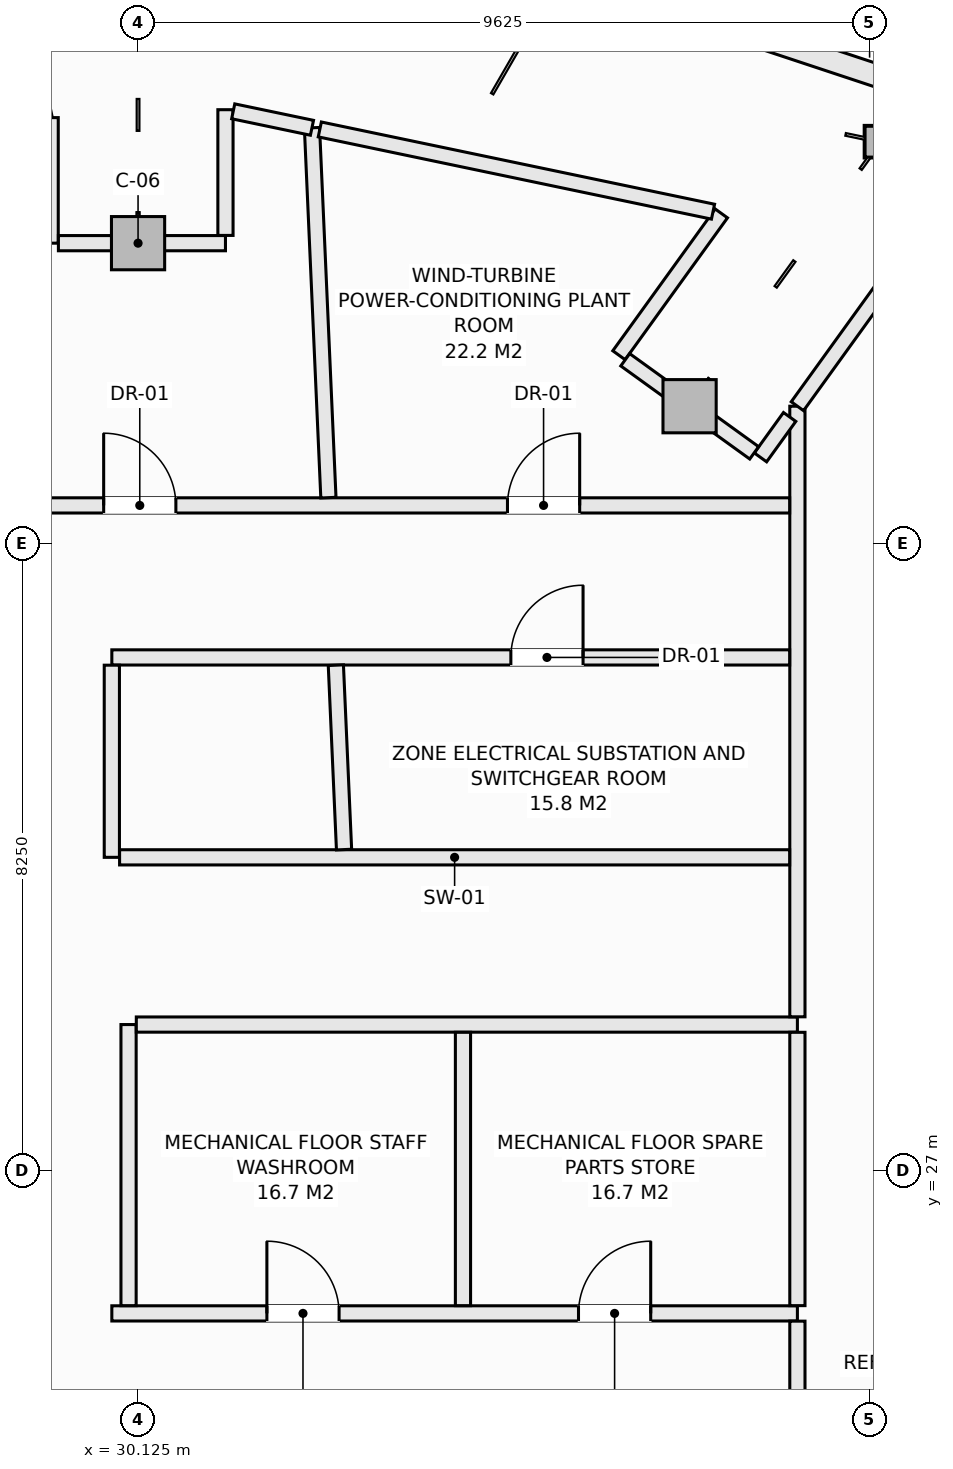
"""IFC4 building model, lengths in metres.
Left out: names, types, materials, properties, quantities, classifications, styles, units other than length and angle.
Written with IfcOpenShell. Run it as: python <this file> out.ifc"""

import sys

from ifc_helpers import new_model, si_unit, direction, frame, frame_2d, origin, origin_2d, place, context, subcontext, project, spatial, rectangle, hollow_rectangle, extrude, element, fill, save


model = new_model("IFC4")
c1 = context("Model", 3, precision=1e-05, world=origin(), true_north=direction((0.0, 1.0)))
c2 = subcontext(c1, "Body", "Model", "MODEL_VIEW")
j1 = project(units=[si_unit("LENGTHUNIT", "METRE"), si_unit("PLANEANGLEUNIT", "RADIAN")], contexts=[c1])
p1 = place(None, origin())
s1 = spatial("IfcSite", under=j1, at=p1, CompositionType="ELEMENT")
p2 = place(p1, origin())
s2 = spatial("IfcBuilding", under=s1, at=p2, CompositionType="ELEMENT")
p3 = place(p2, frame((0.0, 0.0, 275.6)))
s3 = spatial("IfcBuildingStorey", under=s2, at=p3, CompositionType="ELEMENT", Elevation=275.6)
p4 = place(p3, frame((39.893, 40.535, -0.32), z_axis=(0.0, 0.0, 1.0), x_axis=(1.0, 0.0, 0.0)))
e1 = element("IfcColumn", 1, at=p4, inside=s3, PredefinedType="COLUMN", context=c2, shape_type="SweptSolid", body=[
    extrude(hollow_rectangle(XDim=0.406, YDim=0.406, WallThickness=0.016, at=origin_2d()), origin(), (0.0, 0.0, 1.0), 6.04),
])
for number, where, z_axis, x_axis in (
    (2, (37.382, 37.055, -0.32), (0.0, 0.0, 1.0), (1.0, 0.0, 0.0)),
    (3, (30.125, 39.2, -0.32), (0.0, 0.0, 1.0), (1.0, 0.0, 0.0)),
):
    element("IfcColumn", number, at=place(p3, frame(where, z_axis=z_axis, x_axis=x_axis)), inside=s3, PredefinedType="COLUMN", context=c2, shape_type="SweptSolid", body=[
        extrude(rectangle(XDim=0.7, YDim=0.7, at=origin_2d()), origin(), (0.0, 0.0, 1.0), 6.04),
    ])
p5 = place(p3, frame((35.439, 42.865, 0.0), z_axis=(0.0, 0.0, 1.0), x_axis=(0.949252744709, -0.314514271001, 0.0)))
e4 = element("IfcWall", 4, at=p5, inside=s3, PredefinedType="SOLIDWALL", context=c2, shape_type="SweptSolid", body=[
    extrude(rectangle(XDim=5.216, YDim=0.3, at=frame_2d((2.608, 0.0))), origin(), (0.0, 0.0, 1.0), 1.15),
])
p6 = place(p3, frame((29.78, 25.12, 0.0), z_axis=(0.0, 0.0, 1.0), x_axis=(1.0, 0.0, 0.0)))
e5 = element("IfcWall", 5, at=p6, inside=s3, PredefinedType="SOLIDWALL", context=c2, shape_type="SweptSolid", body=[
    extrude(rectangle(XDim=9.02, YDim=0.2, at=frame_2d((4.51, 0.0))), origin(), (0.0, 0.0, 1.0), 5.72),
])
p7 = place(p6, frame((2.04, 0.0, 0.0)))
e6 = element("IfcOpeningElement", 6, at=p7, cuts=e5, PredefinedType="OPENING", context=c2, shape_type="SweptSolid", body=[
    extrude(rectangle(XDim=0.95, YDim=2.1, at=frame_2d((0.475, 1.05))), frame((0.0, 0.11, 0.0), z_axis=(0.0, -1.0, 0.0), x_axis=(1.0, 0.0, 0.0)), (0.0, 0.0, 1.0), 0.22),
])
p8 = place(p6, frame((6.14, 0.0, 0.0)))
e7 = element("IfcOpeningElement", 7, at=p8, cuts=e5, PredefinedType="OPENING", context=c2, shape_type="SweptSolid", body=[
    extrude(rectangle(XDim=0.95, YDim=2.1, at=frame_2d((0.475, 1.05))), frame((0.0, 0.11, 0.0), z_axis=(0.0, -1.0, 0.0), x_axis=(1.0, 0.0, 0.0)), (0.0, 0.0, 1.0), 0.22),
])
p9 = place(p3, frame((30.0, 25.222, 0.0), z_axis=(0.0, 0.0, 1.0), x_axis=(0.0, 1.0, 0.0)))
e8 = element("IfcWall", 8, at=p9, inside=s3, PredefinedType="SOLIDWALL", context=c2, shape_type="SweptSolid", body=[
    extrude(rectangle(XDim=3.698, YDim=0.2, at=frame_2d((1.849, 0.0))), origin(), (0.0, 0.0, 1.0), 5.72),
])
p10 = place(p3, frame((30.102, 28.92, 0.0), z_axis=(0.0, 0.0, 1.0), x_axis=(1.0, 0.0, 0.0)))
e9 = element("IfcWall", 9, at=p10, inside=s3, PredefinedType="SOLIDWALL", context=c2, shape_type="SweptSolid", body=[
    extrude(rectangle(XDim=8.698, YDim=0.2, at=frame_2d((4.349, 0.0))), origin(), (0.0, 0.0, 1.0), 5.72),
])
p11 = place(p3, frame((34.4, 25.222, 0.0), z_axis=(0.0, 0.0, 1.0), x_axis=(0.0, 1.0, 0.0)))
e10 = element("IfcWall", 10, at=p11, inside=s3, PredefinedType="SOLIDWALL", context=c2, shape_type="SweptSolid", body=[
    extrude(rectangle(XDim=3.596, YDim=0.2, at=frame_2d((1.798, 0.0))), origin(), (0.0, 0.0, 1.0), 5.72),
])
p12 = place(p3, frame((38.8, 23.02, 0.0), z_axis=(0.0, 0.0, 1.0), x_axis=(0.0, 1.0, 0.0)))
e11 = element("IfcWall", 11, at=p12, inside=s3, PredefinedType="SOLIDWALL", context=c2, shape_type="SweptSolid", body=[
    extrude(rectangle(XDim=1.998, YDim=0.2, at=frame_2d((0.999, 0.0))), origin(), (0.0, 0.0, 1.0), 5.72),
])
p13 = place(p3, frame((38.8, 25.222, 0.0), z_axis=(0.0, 0.0, 1.0), x_axis=(0.0, 1.0, 0.0)))
e12 = element("IfcWall", 12, at=p13, inside=s3, PredefinedType="SOLIDWALL", context=c2, shape_type="SweptSolid", body=[
    extrude(rectangle(XDim=3.596, YDim=0.2, at=frame_2d((1.798, 0.0))), origin(), (0.0, 0.0, 1.0), 5.72),
])
p14 = place(p3, frame((38.8, 29.022, 0.0), z_axis=(0.0, 0.0, 1.0), x_axis=(0.0, 1.0, 0.0)))
e13 = element("IfcWall", 13, at=p14, inside=s3, PredefinedType="SOLIDWALL", context=c2, shape_type="SweptSolid", body=[
    extrude(rectangle(XDim=8.033, YDim=0.2, at=frame_2d((4.017, 0.0))), origin(), (0.0, 0.0, 1.0), 5.72),
])
p15 = place(p3, frame((27.252, 35.75, 0.0), z_axis=(0.0, 0.0, 1.0), x_axis=(1.0, 0.0, 0.0)))
e14 = element("IfcWall", 14, at=p15, inside=s3, PredefinedType="SOLIDWALL", context=c2, shape_type="SweptSolid", body=[
    extrude(rectangle(XDim=11.446, YDim=0.2, at=frame_2d((5.723, 0.0))), origin(), (0.0, 0.0, 1.0), 5.168),
])
p16 = place(p15, frame((2.421, 0.0, 0.0)))
e15 = element("IfcOpeningElement", 15, at=p16, cuts=e14, PredefinedType="OPENING", context=c2, shape_type="SweptSolid", body=[
    extrude(rectangle(XDim=0.95, YDim=2.1, at=frame_2d((0.475, 1.05))), frame((0.0, 0.11, 0.0), z_axis=(0.0, -1.0, 0.0), x_axis=(1.0, 0.0, 0.0)), (0.0, 0.0, 1.0), 0.22),
])
p17 = place(p15, frame((7.733, 0.0, 0.0)))
e16 = element("IfcOpeningElement", 16, at=p17, cuts=e14, PredefinedType="OPENING", context=c2, shape_type="SweptSolid", body=[
    extrude(rectangle(XDim=0.95, YDim=2.1, at=frame_2d((0.475, 1.05))), frame((0.0, 0.11, 0.0), z_axis=(0.0, -1.0, 0.0), x_axis=(1.0, 0.0, 0.0)), (0.0, 0.0, 1.0), 0.22),
])
p18 = place(p3, frame((29.78, 33.75, 0.0), z_axis=(0.0, 0.0, 1.0), x_axis=(1.0, 0.0, 0.0)))
e17 = element("IfcWall", 17, at=p18, inside=s3, PredefinedType="SOLIDWALL", context=c2, shape_type="SweptSolid", body=[
    extrude(rectangle(XDim=8.918, YDim=0.2, at=frame_2d((4.459, 0.0))), origin(), (0.0, 0.0, 1.0), 5.72),
])
p19 = place(p18, frame((5.25, 0.0, 0.0)))
e18 = element("IfcOpeningElement", 18, at=p19, cuts=e17, PredefinedType="OPENING", context=c2, shape_type="SweptSolid", body=[
    extrude(rectangle(XDim=0.95, YDim=2.1, at=frame_2d((0.475, 1.05))), frame((0.0, 0.11, 0.0), z_axis=(0.0, -1.0, 0.0), x_axis=(1.0, 0.0, 0.0)), (0.0, 0.0, 1.0), 0.22),
])
p20 = place(p3, frame((29.78, 31.12, 0.0), z_axis=(0.0, 0.0, 1.0), x_axis=(0.0, 1.0, 0.0)))
e19 = element("IfcWall", 19, at=p20, inside=s3, PredefinedType="SOLIDWALL", context=c2, shape_type="SweptSolid", body=[
    extrude(rectangle(XDim=2.528, YDim=0.2, at=frame_2d((1.264, 0.0))), origin(), (0.0, 0.0, 1.0), 5.72),
])
p21 = place(p3, frame((29.882, 31.12, 0.0), z_axis=(0.0, 0.0, 1.0), x_axis=(1.0, 0.0, 0.0)))
e20 = element("IfcWall", 20, at=p21, inside=s3, PredefinedType="SOLIDWALL", context=c2, shape_type="SweptSolid", body=[
    extrude(rectangle(XDim=8.816, YDim=0.2, at=frame_2d((4.408, 0.0))), origin(), (0.0, 0.0, 1.0), 5.72),
])
p22 = place(p3, frame((38.314, 36.382, 0.0), z_axis=(0.0, 0.0, 1.0), x_axis=(0.585069222784, 0.810983356519, 0.0)))
e21 = element("IfcWall", 21, at=p22, inside=s3, PredefinedType="SOLIDWALL", context=c2, shape_type="SweptSolid", body=[
    extrude(rectangle(XDim=0.656, YDim=0.2, at=frame_2d((0.328, 0.0))), origin(), (0.0, 0.0, 1.0), 5.72),
])
p23 = place(p3, frame((38.8, 37.055, 0.0), z_axis=(0.0, 0.0, 1.0), x_axis=(0.585158028997, 0.810919281495, 0.0)))
e22 = element("IfcWall", 22, at=p23, inside=s3, PredefinedType="SOLIDWALL", context=c2, shape_type="SweptSolid", body=[
    extrude(rectangle(XDim=2.064, YDim=0.2, at=frame_2d((1.032, 0.0))), origin(), (0.0, 0.0, 1.0), 5.72),
])
p24 = place(p3, frame((36.452, 37.726, 0.0), z_axis=(0.0, 0.0, 1.0), x_axis=(0.585304643713, 0.810813464397, 0.0)))
e23 = element("IfcWall", 23, at=p24, inside=s3, PredefinedType="SOLIDWALL", context=c2, shape_type="SweptSolid", body=[
    extrude(rectangle(XDim=2.302, YDim=0.2, at=frame_2d((1.151, 0.0))), origin(), (0.0, 0.0, 1.0), 5.72),
])
p25 = place(p3, frame((32.413, 40.718, 0.0), z_axis=(0.0, 0.0, 1.0), x_axis=(0.044359482004, -0.99901563369, 0.0)))
e24 = element("IfcWall", 24, at=p25, inside=s3, PredefinedType="SOLIDWALL", context=c2, shape_type="SweptSolid", body=[
    extrude(rectangle(XDim=4.871, YDim=0.2, at=frame_2d((2.436, 0.0))), origin(), (0.0, 0.0, 1.0), 5.72),
])
p26 = place(p3, frame((32.727, 33.648, 0.0), z_axis=(0.0, 0.0, 1.0), x_axis=(0.044436288755, -0.999012220266, 0.0)))
e25 = element("IfcWall", 25, at=p26, inside=s3, PredefinedType="SOLIDWALL", context=c2, shape_type="SweptSolid", body=[
    extrude(rectangle(XDim=2.428, YDim=0.2, at=frame_2d((1.214, 0.0))), origin(), (0.0, 0.0, 1.0), 5.72),
])
p27 = place(p3, frame((28.975, 39.2, 0.0), z_axis=(0.0, 0.0, 1.0), x_axis=(0.0, 1.0, 0.0)))
e26 = element("IfcWall", 26, at=p27, inside=s3, PredefinedType="SOLIDWALL", context=c2, shape_type="SweptSolid", body=[
    extrude(rectangle(XDim=1.652, YDim=0.2, at=frame_2d((0.826, 0.0))), origin(), (0.0, 0.0, 1.0), 5.72),
])
p28 = place(p3, frame((29.077, 39.2, 0.0), z_axis=(0.0, 0.0, 1.0), x_axis=(1.0, 0.0, 0.0)))
e27 = element("IfcWall", 27, at=p28, inside=s3, PredefinedType="SOLIDWALL", context=c2, shape_type="SweptSolid", body=[
    extrude(rectangle(XDim=2.198, YDim=0.2, at=frame_2d((1.099, 0.0))), origin(), (0.0, 0.0, 1.0), 5.168),
])
p29 = place(p3, frame((31.275, 39.302, 0.0), z_axis=(0.0, 0.0, 1.0), x_axis=(0.0, 1.0, 0.0)))
e28 = element("IfcWall", 28, at=p29, inside=s3, PredefinedType="SOLIDWALL", context=c2, shape_type="SweptSolid", body=[
    extrude(rectangle(XDim=1.654, YDim=0.2, at=frame_2d((0.827, 0.0))), origin(), (0.0, 0.0, 1.0), 5.72),
])
p30 = place(p3, frame((31.377, 40.935, 0.0), z_axis=(0.0, 0.0, 1.0), x_axis=(0.97880352916, -0.204801492435, 0.0)))
e29 = element("IfcWall", 29, at=p30, inside=s3, PredefinedType="SOLIDWALL", context=c2, shape_type="SweptSolid", body=[
    extrude(rectangle(XDim=1.059, YDim=0.2, at=frame_2d((0.529, 0.0))), origin(), (0.0, 0.0, 1.0), 5.72),
])
p31 = place(p3, frame((32.516, 40.696, 0.0), z_axis=(0.0, 0.0, 1.0), x_axis=(0.978828735441, -0.204680987576, 0.0)))
e30 = element("IfcWall", 30, at=p31, inside=s3, PredefinedType="SOLIDWALL", context=c2, shape_type="SweptSolid", body=[
    extrude(rectangle(XDim=5.285, YDim=0.2, at=frame_2d((2.643, 0.0))), origin(), (0.0, 0.0, 1.0), 5.72),
])
p32 = place(p3, frame((36.535, 37.666, 0.0), z_axis=(0.0, 0.0, 1.0), x_axis=(0.810829966336, -0.585281783154, 0.0)))
e31 = element("IfcWall", 31, at=p32, inside=s3, PredefinedType="SOLIDWALL", context=c2, shape_type="SweptSolid", body=[
    extrude(rectangle(XDim=2.092, YDim=0.2, at=frame_2d((1.046, 0.0))), origin(), (0.0, 0.0, 1.0), 5.168),
])
p33 = place(p7, origin())
e32 = element("IfcDoor", 32, at=p33, inside=s3, OperationType="SINGLE_SWING_LEFT", PredefinedType="DOOR", context=c2, shape_type="SweptSolid", body=[
    extrude(rectangle(XDim=0.95, YDim=2.1, at=frame_2d((0.475, 1.05))), frame((0.0, 0.025, 0.0), z_axis=(0.0, -1.0, 0.0), x_axis=(1.0, 0.0, 0.0)), (0.0, 0.0, 1.0), 0.05),
])
fill(e6, e32)
p34 = place(p8, origin())
e33 = element("IfcDoor", 33, at=p34, inside=s3, OperationType="SINGLE_SWING_RIGHT", PredefinedType="DOOR", context=c2, shape_type="SweptSolid", body=[
    extrude(rectangle(XDim=0.95, YDim=2.1, at=frame_2d((0.475, 1.05))), frame((0.0, 0.025, 0.0), z_axis=(0.0, -1.0, 0.0), x_axis=(1.0, 0.0, 0.0)), (0.0, 0.0, 1.0), 0.05),
])
fill(e7, e33)
p35 = place(p19, origin())
e34 = element("IfcDoor", 34, at=p35, inside=s3, OperationType="SINGLE_SWING_RIGHT", PredefinedType="DOOR", context=c2, shape_type="SweptSolid", body=[
    extrude(rectangle(XDim=0.95, YDim=2.1, at=frame_2d((0.475, 1.05))), frame((0.0, 0.025, 0.0), z_axis=(0.0, -1.0, 0.0), x_axis=(1.0, 0.0, 0.0)), (0.0, 0.0, 1.0), 0.05),
])
fill(e18, e34)
p36 = place(p16, origin())
e35 = element("IfcDoor", 35, at=p36, inside=s3, OperationType="SINGLE_SWING_LEFT", PredefinedType="DOOR", context=c2, shape_type="SweptSolid", body=[
    extrude(rectangle(XDim=0.95, YDim=2.1, at=frame_2d((0.475, 1.05))), frame((0.0, 0.025, 0.0), z_axis=(0.0, -1.0, 0.0), x_axis=(1.0, 0.0, 0.0)), (0.0, 0.0, 1.0), 0.05),
])
fill(e15, e35)
p37 = place(p17, origin())
e36 = element("IfcDoor", 36, at=p37, inside=s3, OperationType="SINGLE_SWING_RIGHT", PredefinedType="DOOR", context=c2, shape_type="SweptSolid", body=[
    extrude(rectangle(XDim=0.95, YDim=2.1, at=frame_2d((0.475, 1.05))), frame((0.0, 0.025, 0.0), z_axis=(0.0, -1.0, 0.0), x_axis=(1.0, 0.0, 0.0)), (0.0, 0.0, 1.0), 0.05),
])
fill(e16, e36)
save(model, sys.argv[1])
